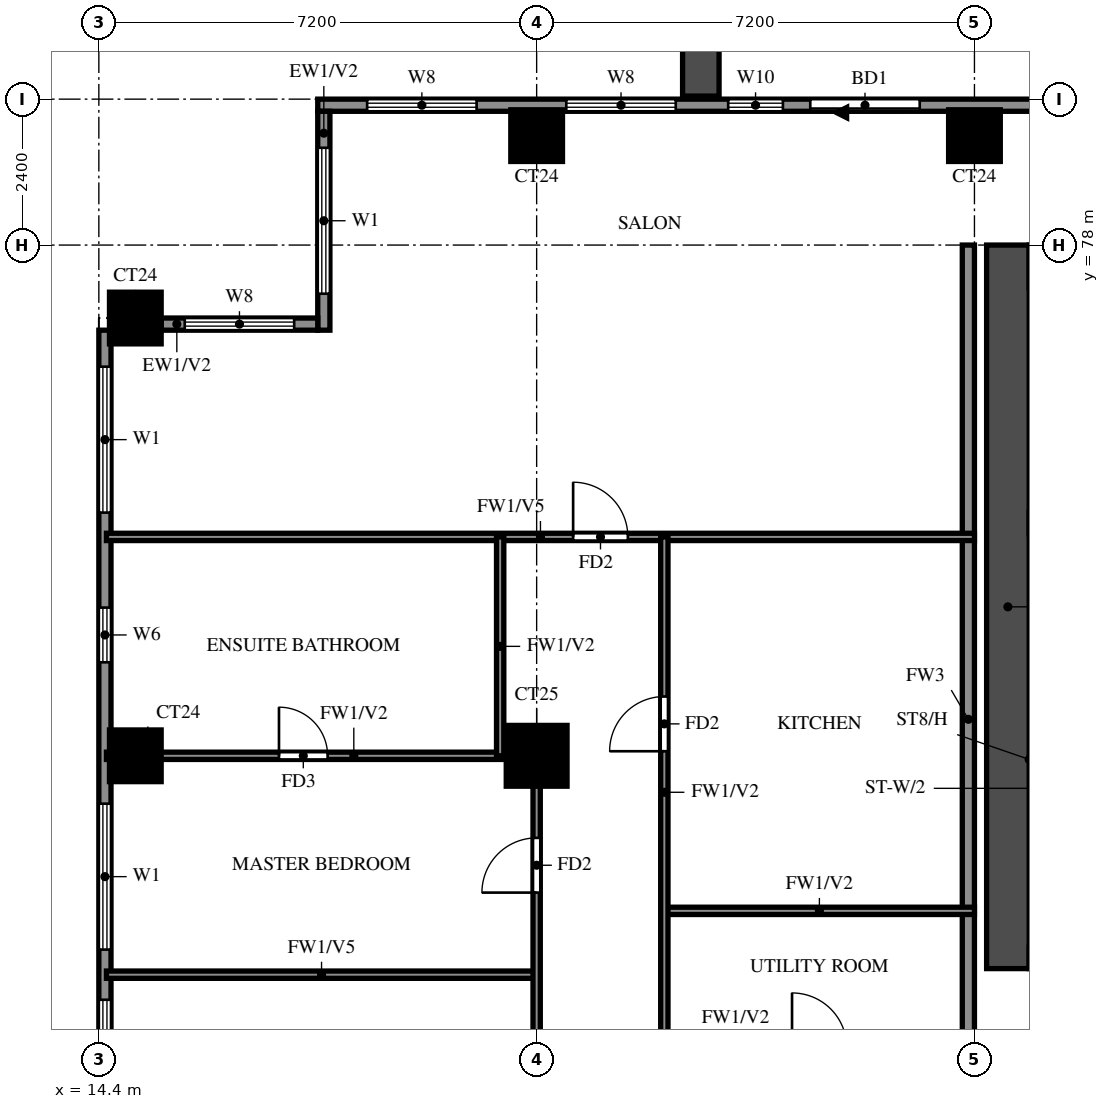
"""IFC4 building model, lengths in metres.
Left out: names, types, materials, properties, quantities, classifications, styles, units other than length and angle.
Written with IfcOpenShell. Run it as: python <this file> out.ifc"""

import sys

from ifc_helpers import new_model, si_unit, direction, frame, frame_2d, origin, origin_2d, place, context, subcontext, project, spatial, rectangle, extrude, source, transform, mapped, element, fill, save


model = new_model("IFC4")
c1 = context("Model", 3, precision=1e-05, world=origin(), true_north=direction((0.0, 1.0)))
c2 = subcontext(c1, "Body", "Model", "MODEL_VIEW")
j1 = project(units=[si_unit("LENGTHUNIT", "METRE"), si_unit("PLANEANGLEUNIT", "RADIAN")], contexts=[c1])
p1 = place(None, origin())
s1 = spatial("IfcSite", under=j1, at=p1, CompositionType="ELEMENT")
p2 = place(p1, origin())
s2 = spatial("IfcBuilding", under=s1, at=p2, CompositionType="ELEMENT")
p3 = place(p2, frame((0.0, 0.0, 146.5)))
s3 = spatial("IfcBuildingStorey", under=s2, at=p3, CompositionType="ELEMENT", Elevation=146.5)
m1 = source(origin(), c2, "Body", "SweptSolid", [
    extrude(rectangle(XDim=0.85, YDim=0.85, at=origin_2d()), origin(), (0.0, 0.0, 1.0), 3.2),
])
p4 = place(p3, frame((15.0, 69.6, 0.0), z_axis=(0.0, 0.0, 1.0), x_axis=(1.0, 0.0, 0.0)))
e1 = element("IfcColumn", 1, at=p4, inside=s3, PredefinedType="COLUMN", context=c2, shape_type="MappedRepresentation", body=[
    mapped(m1, transform((0.0, 0.0, 0.0))),
])
m2 = source(origin(), c2, "Body", "SweptSolid", [
    extrude(rectangle(XDim=1.0, YDim=1.0, at=origin_2d()), origin(), (0.0, 0.0, 1.0), 3.2),
])
p5 = place(p3, frame((21.6, 69.6, 0.0), z_axis=(0.0, 0.0, 1.0), x_axis=(1.0, 0.0, 0.0)))
e2 = element("IfcColumn", 2, at=p5, inside=s3, PredefinedType="COLUMN", context=c2, shape_type="MappedRepresentation", body=[
    mapped(m2, transform((0.0, 0.0, 0.0))),
])
for number, where, z_axis, x_axis in (
    (3, (15.0, 76.8, 0.0), (0.0, 0.0, 1.0), (1.0, 0.0, 0.0)),
    (4, (21.6, 79.8, 0.0), (0.0, 0.0, 1.0), (1.0, 0.0, 0.0)),
    (5, (28.8, 79.8, 0.0), (0.0, 0.0, 1.0), (1.0, 0.0, 0.0)),
):
    element("IfcColumn", number, at=place(p3, frame(where, z_axis=z_axis, x_axis=x_axis)), inside=s3, PredefinedType="COLUMN", context=c2, shape_type="MappedRepresentation", body=[
        mapped(m1, transform((0.0, 0.0, 0.0))),
    ])
p6 = place(p3, frame((29.35, 66.1, 0.0), z_axis=(0.0, 0.0, 1.0), x_axis=(0.0, 1.0, 0.0)))
e6 = element("IfcWall", 6, at=p6, inside=s3, PredefinedType="SHEAR", context=c2, shape_type="SweptSolid", body=[
    extrude(rectangle(XDim=11.9, YDim=0.7, at=frame_2d((5.95, 0.0))), origin(), (0.0, 0.0, 1.0), 3.2),
])
p7 = place(p3, frame((82.6, 80.3, 0.0), z_axis=(0.0, 0.0, 1.0), x_axis=(-1.0, 0.0, 0.0)))
e7 = element("IfcWall", 7, at=p7, inside=s3, PredefinedType="SOLIDWALL", context=c2, shape_type="SweptSolid", body=[
    extrude(rectangle(XDim=64.6, YDim=0.2, at=frame_2d((32.3, 0.0))), origin(), (0.0, 0.0, 1.0), 3.2),
])
p8 = place(p7, frame((54.7, 0.0, 0.0)))
e8 = element("IfcOpeningElement", 8, at=p8, cuts=e7, PredefinedType="OPENING", context=c2, shape_type="SweptSolid", body=[
    extrude(rectangle(XDim=1.8, YDim=2.4, at=frame_2d((0.9, 1.2))), frame((0.0, 0.11, 0.0), z_axis=(0.0, -1.0, 0.0), x_axis=(1.0, 0.0, 0.0)), (0.0, 0.0, 1.0), 0.22),
])
p9 = place(p7, frame((56.95, 0.0, 0.6)))
e9 = element("IfcOpeningElement", 9, at=p9, cuts=e7, PredefinedType="OPENING", context=c2, shape_type="SweptSolid", body=[
    extrude(rectangle(XDim=0.9, YDim=2.4, at=frame_2d((0.45, 1.2))), frame((0.0, 0.11, 0.0), z_axis=(0.0, -1.0, 0.0), x_axis=(1.0, 0.0, 0.0)), (0.0, 0.0, 1.0), 0.22),
])
p10 = place(p7, frame((58.712, 0.0, 0.6)))
e10 = element("IfcOpeningElement", 10, at=p10, cuts=e7, PredefinedType="OPENING", context=c2, shape_type="SweptSolid", body=[
    extrude(rectangle(XDim=1.8, YDim=2.4, at=frame_2d((0.9, 1.2))), frame((0.0, 0.11, 0.0), z_axis=(0.0, -1.0, 0.0), x_axis=(1.0, 0.0, 0.0)), (0.0, 0.0, 1.0), 0.22),
])
p11 = place(p7, frame((61.988, 0.0, 0.6)))
e11 = element("IfcOpeningElement", 11, at=p11, cuts=e7, PredefinedType="OPENING", context=c2, shape_type="SweptSolid", body=[
    extrude(rectangle(XDim=1.8, YDim=2.4, at=frame_2d((0.9, 1.2))), frame((0.0, 0.11, 0.0), z_axis=(0.0, -1.0, 0.0), x_axis=(1.0, 0.0, 0.0)), (0.0, 0.0, 1.0), 0.22),
])
p12 = place(p7, frame((0.712, 0.0, 0.6)))
e12 = element("IfcOpeningElement", 12, at=p12, cuts=e7, PredefinedType="OPENING", context=c2, shape_type="SweptSolid", body=[
    extrude(rectangle(XDim=1.8, YDim=2.4, at=frame_2d((0.9, 1.2))), frame((0.0, 0.11, 0.0), z_axis=(0.0, -1.0, 0.0), x_axis=(1.0, 0.0, 0.0)), (0.0, 0.0, 1.0), 0.22),
])
p13 = place(p7, frame((4.358, 0.0, 0.6)))
e13 = element("IfcOpeningElement", 13, at=p13, cuts=e7, PredefinedType="OPENING", context=c2, shape_type="SweptSolid", body=[
    extrude(rectangle(XDim=2.4, YDim=2.4, at=frame_2d((1.2, 1.2))), frame((0.0, 0.11, 0.0), z_axis=(0.0, -1.0, 0.0), x_axis=(1.0, 0.0, 0.0)), (0.0, 0.0, 1.0), 0.22),
])
p14 = place(p7, frame((7.242, 0.0, 0.6)))
e14 = element("IfcOpeningElement", 14, at=p14, cuts=e7, PredefinedType="OPENING", context=c2, shape_type="SweptSolid", body=[
    extrude(rectangle(XDim=2.4, YDim=2.4, at=frame_2d((1.2, 1.2))), frame((0.0, 0.11, 0.0), z_axis=(0.0, -1.0, 0.0), x_axis=(1.0, 0.0, 0.0)), (0.0, 0.0, 1.0), 0.22),
])
p15 = place(p3, frame((18.1, 80.2, 0.0), z_axis=(0.0, 0.0, 1.0), x_axis=(0.0, -1.0, 0.0)))
e15 = element("IfcWall", 15, at=p15, inside=s3, PredefinedType="SOLIDWALL", context=c2, shape_type="SweptSolid", body=[
    extrude(rectangle(XDim=3.6, YDim=0.2, at=frame_2d((1.8, 0.0))), origin(), (0.0, 0.0, 1.0), 3.2),
])
p16 = place(p15, frame((0.6, 0.0, 0.6)))
e16 = element("IfcOpeningElement", 16, at=p16, cuts=e15, PredefinedType="OPENING", context=c2, shape_type="SweptSolid", body=[
    extrude(rectangle(XDim=2.4, YDim=2.4, at=frame_2d((1.2, 1.2))), frame((0.0, 0.11, 0.0), z_axis=(0.0, -1.0, 0.0), x_axis=(1.0, 0.0, 0.0)), (0.0, 0.0, 1.0), 0.22),
])
p17 = place(p3, frame((18.0, 76.7, 0.0), z_axis=(0.0, 0.0, 1.0), x_axis=(-1.0, 0.0, 0.0)))
e17 = element("IfcWall", 17, at=p17, inside=s3, PredefinedType="SOLIDWALL", context=c2, shape_type="SweptSolid", body=[
    extrude(rectangle(XDim=2.575, YDim=0.2, at=frame_2d((1.288, 0.0))), origin(), (0.0, 0.0, 1.0), 3.2),
])
p18 = place(p17, frame((0.387, 0.0, 0.6)))
e18 = element("IfcOpeningElement", 18, at=p18, cuts=e17, PredefinedType="OPENING", context=c2, shape_type="SweptSolid", body=[
    extrude(rectangle(XDim=1.8, YDim=2.4, at=frame_2d((0.9, 1.2))), frame((0.0, 0.11, 0.0), z_axis=(0.0, -1.0, 0.0), x_axis=(1.0, 0.0, 0.0)), (0.0, 0.0, 1.0), 0.22),
])
p19 = place(p3, frame((14.5, 76.6, 0.0), z_axis=(0.0, 0.0, 1.0), x_axis=(0.0, -1.0, 0.0)))
e19 = element("IfcWall", 19, at=p19, inside=s3, PredefinedType="SOLIDWALL", context=c2, shape_type="SweptSolid", body=[
    extrude(rectangle(XDim=33.4, YDim=0.2, at=frame_2d((16.7, 0.0))), origin(), (0.0, 0.0, 1.0), 3.2),
])
p20 = place(p19, frame((29.887, 0.0, 0.6)))
e20 = element("IfcOpeningElement", 20, at=p20, cuts=e19, PredefinedType="OPENING", context=c2, shape_type="SweptSolid", body=[
    extrude(rectangle(XDim=2.4, YDim=2.4, at=frame_2d((1.2, 1.2))), frame((0.0, 0.11, 0.0), z_axis=(0.0, -1.0, 0.0), x_axis=(1.0, 0.0, 0.0)), (0.0, 0.0, 1.0), 0.22),
])
p21 = place(p19, frame((22.358, 0.0, 0.6)))
e21 = element("IfcOpeningElement", 21, at=p21, cuts=e19, PredefinedType="OPENING", context=c2, shape_type="SweptSolid", body=[
    extrude(rectangle(XDim=2.4, YDim=2.4, at=frame_2d((1.2, 1.2))), frame((0.0, 0.11, 0.0), z_axis=(0.0, -1.0, 0.0), x_axis=(1.0, 0.0, 0.0)), (0.0, 0.0, 1.0), 0.22),
])
p22 = place(p19, frame((25.242, 0.0, 0.6)))
e22 = element("IfcOpeningElement", 22, at=p22, cuts=e19, PredefinedType="OPENING", context=c2, shape_type="SweptSolid", body=[
    extrude(rectangle(XDim=2.4, YDim=2.4, at=frame_2d((1.2, 1.2))), frame((0.0, 0.11, 0.0), z_axis=(0.0, -1.0, 0.0), x_axis=(1.0, 0.0, 0.0)), (0.0, 0.0, 1.0), 0.22),
])
p23 = place(p19, frame((14.988, 0.0, 0.6)))
e23 = element("IfcOpeningElement", 23, at=p23, cuts=e19, PredefinedType="OPENING", context=c2, shape_type="SweptSolid", body=[
    extrude(rectangle(XDim=2.4, YDim=2.4, at=frame_2d((1.2, 1.2))), frame((0.0, 0.11, 0.0), z_axis=(0.0, -1.0, 0.0), x_axis=(1.0, 0.0, 0.0)), (0.0, 0.0, 1.0), 0.22),
])
p24 = place(p19, frame((18.962, 0.0, 1.5)))
e24 = element("IfcOpeningElement", 24, at=p24, cuts=e19, PredefinedType="OPENING", context=c2, shape_type="SweptSolid", body=[
    extrude(rectangle(XDim=0.9, YDim=0.9, at=frame_2d((0.45, 0.45))), frame((0.0, 0.11, 0.0), z_axis=(0.0, -1.0, 0.0), x_axis=(1.0, 0.0, 0.0)), (0.0, 0.0, 1.0), 0.22),
])
p25 = place(p19, frame((11.012, 0.0, 0.6)))
e25 = element("IfcOpeningElement", 25, at=p25, cuts=e19, PredefinedType="OPENING", context=c2, shape_type="SweptSolid", body=[
    extrude(rectangle(XDim=2.4, YDim=2.4, at=frame_2d((1.2, 1.2))), frame((0.0, 0.11, 0.0), z_axis=(0.0, -1.0, 0.0), x_axis=(1.0, 0.0, 0.0)), (0.0, 0.0, 1.0), 0.22),
])
p26 = place(p19, frame((7.788, 0.0, 0.6)))
e26 = element("IfcOpeningElement", 26, at=p26, cuts=e19, PredefinedType="OPENING", context=c2, shape_type="SweptSolid", body=[
    extrude(rectangle(XDim=2.4, YDim=2.4, at=frame_2d((1.2, 1.2))), frame((0.0, 0.11, 0.0), z_axis=(0.0, -1.0, 0.0), x_axis=(1.0, 0.0, 0.0)), (0.0, 0.0, 1.0), 0.22),
])
p27 = place(p19, frame((4.562, 0.0, 1.5)))
e27 = element("IfcOpeningElement", 27, at=p27, cuts=e19, PredefinedType="OPENING", context=c2, shape_type="SweptSolid", body=[
    extrude(rectangle(XDim=0.9, YDim=0.9, at=frame_2d((0.45, 0.45))), frame((0.0, 0.11, 0.0), z_axis=(0.0, -1.0, 0.0), x_axis=(1.0, 0.0, 0.0)), (0.0, 0.0, 1.0), 0.22),
])
p28 = place(p19, frame((0.6, 0.0, 0.6)))
e28 = element("IfcOpeningElement", 28, at=p28, cuts=e19, PredefinedType="OPENING", context=c2, shape_type="SweptSolid", body=[
    extrude(rectangle(XDim=2.4, YDim=2.4, at=frame_2d((1.2, 1.2))), frame((0.0, 0.11, 0.0), z_axis=(0.0, -1.0, 0.0), x_axis=(1.0, 0.0, 0.0)), (0.0, 0.0, 1.0), 0.22),
])
p29 = place(p3, frame((24.3, 80.45, 0.0), z_axis=(0.0, 0.0, 1.0), x_axis=(0.0, 1.0, 0.0)))
e29 = element("IfcWall", 29, at=p29, inside=s3, PredefinedType="SOLIDWALL", context=c2, shape_type="SweptSolid", body=[
    extrude(rectangle(XDim=2.65, YDim=0.6, at=frame_2d((1.325, 0.0))), origin(), (0.0, 0.0, 1.0), 2.85),
])
p30 = place(p3, frame((28.7, 62.4, 0.0), z_axis=(0.0, 0.0, 1.0), x_axis=(0.0, 1.0, 0.0)))
e30 = element("IfcWall", 30, at=p30, inside=s3, PredefinedType="SOLIDWALL", context=c2, shape_type="SweptSolid", body=[
    extrude(rectangle(XDim=15.6, YDim=0.2, at=frame_2d((7.8, 0.0))), origin(), (0.0, 0.0, 1.0), 3.2),
])
p31 = place(p3, frame((14.525, 66.0, 0.0), z_axis=(0.0, 0.0, 1.0), x_axis=(1.0, 0.0, 0.0)))
e31 = element("IfcWall", 31, at=p31, inside=s3, PredefinedType="PARTITIONING", context=c2, shape_type="SweptSolid", body=[
    extrude(rectangle(XDim=7.075, YDim=0.12, at=frame_2d((3.538, 0.0))), origin(), (0.0, 0.0, 1.0), 2.3),
])
p32 = place(p3, frame((23.7, 67.05, 0.0), z_axis=(0.0, 0.0, 1.0), x_axis=(1.0, 0.0, 0.0)))
e32 = element("IfcWall", 32, at=p32, inside=s3, PredefinedType="PARTITIONING", context=c2, shape_type="SweptSolid", body=[
    extrude(rectangle(XDim=5.1, YDim=0.12, at=frame_2d((2.55, 0.0))), origin(), (0.0, 0.0, 1.0), 3.2),
])
p33 = place(p3, frame((14.525, 69.6, 0.0), z_axis=(0.0, 0.0, 1.0), x_axis=(1.0, 0.0, 0.0)))
e33 = element("IfcWall", 33, at=p33, inside=s3, PredefinedType="PARTITIONING", context=c2, shape_type="SweptSolid", body=[
    extrude(rectangle(XDim=7.075, YDim=0.12, at=frame_2d((3.538, 0.0))), origin(), (0.0, 0.0, 1.0), 3.2),
])
p34 = place(p33, frame((2.837, 0.0, 0.0)))
e34 = element("IfcOpeningElement", 34, at=p34, cuts=e33, PredefinedType="OPENING", context=c2, shape_type="SweptSolid", body=[
    extrude(rectangle(XDim=0.8, YDim=2.1, at=frame_2d((0.4, 1.05))), frame((0.0, 0.07, 0.0), z_axis=(0.0, -1.0, 0.0), x_axis=(1.0, 0.0, 0.0)), (0.0, 0.0, 1.0), 0.14),
])
p35 = place(p3, frame((14.525, 73.2, 0.0), z_axis=(0.0, 0.0, 1.0), x_axis=(1.0, 0.0, 0.0)))
e35 = element("IfcWall", 35, at=p35, inside=s3, PredefinedType="PARTITIONING", context=c2, shape_type="SweptSolid", body=[
    extrude(rectangle(XDim=14.275, YDim=0.12, at=frame_2d((7.138, 0.0))), origin(), (0.0, 0.0, 1.0), 2.3),
])
p36 = place(p35, frame((7.675, 0.0, 0.0)))
e36 = element("IfcOpeningElement", 36, at=p36, cuts=e35, PredefinedType="OPENING", context=c2, shape_type="SweptSolid", body=[
    extrude(rectangle(XDim=0.9, YDim=2.1, at=frame_2d((0.45, 1.05))), frame((0.0, 0.07, 0.0), z_axis=(0.0, -1.0, 0.0), x_axis=(1.0, 0.0, 0.0)), (0.0, 0.0, 1.0), 0.14),
])
p37 = place(p3, frame((21.0, 69.6, 0.0), z_axis=(0.0, 0.0, 1.0), x_axis=(0.0, 1.0, 0.0)))
e37 = element("IfcWall", 37, at=p37, inside=s3, PredefinedType="PARTITIONING", context=c2, shape_type="SweptSolid", body=[
    extrude(rectangle(XDim=3.6, YDim=0.12, at=frame_2d((1.8, 0.0))), origin(), (0.0, 0.0, 1.0), 3.2),
])
p38 = place(p3, frame((21.6, 58.8, 0.0), z_axis=(0.0, 0.0, 1.0), x_axis=(0.0, 1.0, 0.0)))
e38 = element("IfcWall", 38, at=p38, inside=s3, PredefinedType="PARTITIONING", context=c2, shape_type="SweptSolid", body=[
    extrude(rectangle(XDim=10.8, YDim=0.12, at=frame_2d((5.4, 0.0))), origin(), (0.0, 0.0, 1.0), 3.2),
])
p39 = place(p38, frame((1.35, 0.0, 0.0)))
e39 = element("IfcOpeningElement", 39, at=p39, cuts=e38, PredefinedType="OPENING", context=c2, shape_type="SweptSolid", body=[
    extrude(rectangle(XDim=0.9, YDim=2.1, at=frame_2d((0.45, 1.05))), frame((0.0, 0.07, 0.0), z_axis=(0.0, -1.0, 0.0), x_axis=(1.0, 0.0, 0.0)), (0.0, 0.0, 1.0), 0.14),
])
p40 = place(p38, frame((4.95, 0.0, 0.0)))
e40 = element("IfcOpeningElement", 40, at=p40, cuts=e38, PredefinedType="OPENING", context=c2, shape_type="SweptSolid", body=[
    extrude(rectangle(XDim=0.9, YDim=2.1, at=frame_2d((0.45, 1.05))), frame((0.0, 0.07, 0.0), z_axis=(0.0, -1.0, 0.0), x_axis=(1.0, 0.0, 0.0)), (0.0, 0.0, 1.0), 0.14),
])
p41 = place(p38, frame((8.55, 0.0, 0.0)))
e41 = element("IfcOpeningElement", 41, at=p41, cuts=e38, PredefinedType="OPENING", context=c2, shape_type="SweptSolid", body=[
    extrude(rectangle(XDim=0.9, YDim=2.1, at=frame_2d((0.45, 1.05))), frame((0.0, 0.07, 0.0), z_axis=(0.0, -1.0, 0.0), x_axis=(1.0, 0.0, 0.0)), (0.0, 0.0, 1.0), 0.14),
])
p42 = place(p3, frame((23.7, 64.8, 0.0), z_axis=(0.0, 0.0, 1.0), x_axis=(0.0, 1.0, 0.0)))
e42 = element("IfcWall", 42, at=p42, inside=s3, PredefinedType="PARTITIONING", context=c2, shape_type="SweptSolid", body=[
    extrude(rectangle(XDim=8.4, YDim=0.12, at=frame_2d((4.2, 0.0))), origin(), (0.0, 0.0, 1.0), 3.2),
])
p43 = place(p42, frame((4.875, 0.0, 0.0)))
e43 = element("IfcOpeningElement", 43, at=p43, cuts=e42, PredefinedType="OPENING", context=c2, shape_type="SweptSolid", body=[
    extrude(rectangle(XDim=0.9, YDim=2.1, at=frame_2d((0.45, 1.05))), frame((0.0, 0.07, 0.0), z_axis=(0.0, -1.0, 0.0), x_axis=(1.0, 0.0, 0.0)), (0.0, 0.0, 1.0), 0.14),
])
p44 = place(p8, origin())
e44 = element("IfcDoor", 44, at=p44, inside=s3, OperationType="DOUBLE_DOOR_SLIDING", PredefinedType="DOOR", context=c2, shape_type="SweptSolid", body=[
    extrude(rectangle(XDim=1.8, YDim=2.4, at=frame_2d((0.9, 1.2))), frame((0.0, 0.025, 0.0), z_axis=(0.0, -1.0, 0.0), x_axis=(1.0, 0.0, 0.0)), (0.0, 0.0, 1.0), 0.05),
])
fill(e8, e44)
p45 = place(p9, origin())
e45 = element("IfcWindow", 45, at=p45, inside=s3, PartitioningType="SINGLE_PANEL", PredefinedType="WINDOW", context=c2, shape_type="SweptSolid", body=[
    extrude(rectangle(XDim=0.9, YDim=2.4, at=frame_2d((0.45, 1.2))), frame((0.0, 0.03, 0.0), z_axis=(0.0, -1.0, 0.0), x_axis=(1.0, 0.0, 0.0)), (0.0, 0.0, 1.0), 0.06),
])
fill(e9, e45)
p46 = place(p10, origin())
e46 = element("IfcWindow", 46, at=p46, inside=s3, PartitioningType="DOUBLE_PANEL_VERTICAL", PredefinedType="WINDOW", context=c2, shape_type="SweptSolid", body=[
    extrude(rectangle(XDim=1.8, YDim=2.4, at=frame_2d((0.9, 1.2))), frame((0.0, 0.03, 0.0), z_axis=(0.0, -1.0, 0.0), x_axis=(1.0, 0.0, 0.0)), (0.0, 0.0, 1.0), 0.06),
])
fill(e10, e46)
p47 = place(p11, origin())
e47 = element("IfcWindow", 47, at=p47, inside=s3, PartitioningType="DOUBLE_PANEL_VERTICAL", PredefinedType="WINDOW", context=c2, shape_type="SweptSolid", body=[
    extrude(rectangle(XDim=1.8, YDim=2.4, at=frame_2d((0.9, 1.2))), frame((0.0, 0.03, 0.0), z_axis=(0.0, -1.0, 0.0), x_axis=(1.0, 0.0, 0.0)), (0.0, 0.0, 1.0), 0.06),
])
fill(e11, e47)
p48 = place(p16, origin())
e48 = element("IfcWindow", 48, at=p48, inside=s3, PartitioningType="DOUBLE_PANEL_VERTICAL", PredefinedType="WINDOW", context=c2, shape_type="SweptSolid", body=[
    extrude(rectangle(XDim=2.4, YDim=2.4, at=frame_2d((1.2, 1.2))), frame((0.0, 0.03, 0.0), z_axis=(0.0, -1.0, 0.0), x_axis=(1.0, 0.0, 0.0)), (0.0, 0.0, 1.0), 0.06),
])
fill(e16, e48)
p49 = place(p18, origin())
e49 = element("IfcWindow", 49, at=p49, inside=s3, PartitioningType="DOUBLE_PANEL_VERTICAL", PredefinedType="WINDOW", context=c2, shape_type="SweptSolid", body=[
    extrude(rectangle(XDim=1.8, YDim=2.4, at=frame_2d((0.9, 1.2))), frame((0.0, 0.03, 0.0), z_axis=(0.0, -1.0, 0.0), x_axis=(1.0, 0.0, 0.0)), (0.0, 0.0, 1.0), 0.06),
])
fill(e18, e49)
p50 = place(p25, origin())
e50 = element("IfcWindow", 50, at=p50, inside=s3, PartitioningType="DOUBLE_PANEL_VERTICAL", PredefinedType="WINDOW", context=c2, shape_type="SweptSolid", body=[
    extrude(rectangle(XDim=2.4, YDim=2.4, at=frame_2d((1.2, 1.2))), frame((0.0, 0.03, 0.0), z_axis=(0.0, -1.0, 0.0), x_axis=(1.0, 0.0, 0.0)), (0.0, 0.0, 1.0), 0.06),
])
fill(e25, e50)
p51 = place(p26, origin())
e51 = element("IfcWindow", 51, at=p51, inside=s3, PartitioningType="DOUBLE_PANEL_VERTICAL", PredefinedType="WINDOW", context=c2, shape_type="SweptSolid", body=[
    extrude(rectangle(XDim=2.4, YDim=2.4, at=frame_2d((1.2, 1.2))), frame((0.0, 0.03, 0.0), z_axis=(0.0, -1.0, 0.0), x_axis=(1.0, 0.0, 0.0)), (0.0, 0.0, 1.0), 0.06),
])
fill(e26, e51)
p52 = place(p27, origin())
e52 = element("IfcWindow", 52, at=p52, inside=s3, PartitioningType="SINGLE_PANEL", PredefinedType="WINDOW", context=c2, shape_type="SweptSolid", body=[
    extrude(rectangle(XDim=0.9, YDim=0.9, at=frame_2d((0.45, 0.45))), frame((0.0, 0.03, 0.0), z_axis=(0.0, -1.0, 0.0), x_axis=(1.0, 0.0, 0.0)), (0.0, 0.0, 1.0), 0.06),
])
fill(e27, e52)
p53 = place(p28, origin())
e53 = element("IfcWindow", 53, at=p53, inside=s3, PartitioningType="DOUBLE_PANEL_VERTICAL", PredefinedType="WINDOW", context=c2, shape_type="SweptSolid", body=[
    extrude(rectangle(XDim=2.4, YDim=2.4, at=frame_2d((1.2, 1.2))), frame((0.0, 0.03, 0.0), z_axis=(0.0, -1.0, 0.0), x_axis=(1.0, 0.0, 0.0)), (0.0, 0.0, 1.0), 0.06),
])
fill(e28, e53)
p54 = place(p41, origin())
e54 = element("IfcDoor", 54, at=p54, inside=s3, OperationType="SINGLE_SWING_LEFT", PredefinedType="DOOR", context=c2, shape_type="SweptSolid", body=[
    extrude(rectangle(XDim=0.9, YDim=2.1, at=frame_2d((0.45, 1.05))), frame((0.0, 0.025, 0.0), z_axis=(0.0, -1.0, 0.0), x_axis=(1.0, 0.0, 0.0)), (0.0, 0.0, 1.0), 0.05),
])
fill(e41, e54)
p55 = place(p34, origin())
e55 = element("IfcDoor", 55, at=p55, inside=s3, OperationType="SINGLE_SWING_RIGHT", PredefinedType="DOOR", context=c2, shape_type="SweptSolid", body=[
    extrude(rectangle(XDim=0.8, YDim=2.1, at=frame_2d((0.4, 1.05))), frame((0.0, 0.025, 0.0), z_axis=(0.0, -1.0, 0.0), x_axis=(1.0, 0.0, 0.0)), (0.0, 0.0, 1.0), 0.05),
])
fill(e34, e55)
p56 = place(p36, origin())
e56 = element("IfcDoor", 56, at=p56, inside=s3, OperationType="SINGLE_SWING_LEFT", PredefinedType="DOOR", context=c2, shape_type="SweptSolid", body=[
    extrude(rectangle(XDim=0.9, YDim=2.1, at=frame_2d((0.45, 1.05))), frame((0.0, 0.025, 0.0), z_axis=(0.0, -1.0, 0.0), x_axis=(1.0, 0.0, 0.0)), (0.0, 0.0, 1.0), 0.05),
])
fill(e36, e56)
p57 = place(p43, origin())
e57 = element("IfcDoor", 57, at=p57, inside=s3, OperationType="SINGLE_SWING_RIGHT", PredefinedType="DOOR", context=c2, shape_type="SweptSolid", body=[
    extrude(rectangle(XDim=0.9, YDim=2.1, at=frame_2d((0.45, 1.05))), frame((0.0, 0.025, 0.0), z_axis=(0.0, -1.0, 0.0), x_axis=(1.0, 0.0, 0.0)), (0.0, 0.0, 1.0), 0.05),
])
fill(e43, e57)
save(model, sys.argv[1])
